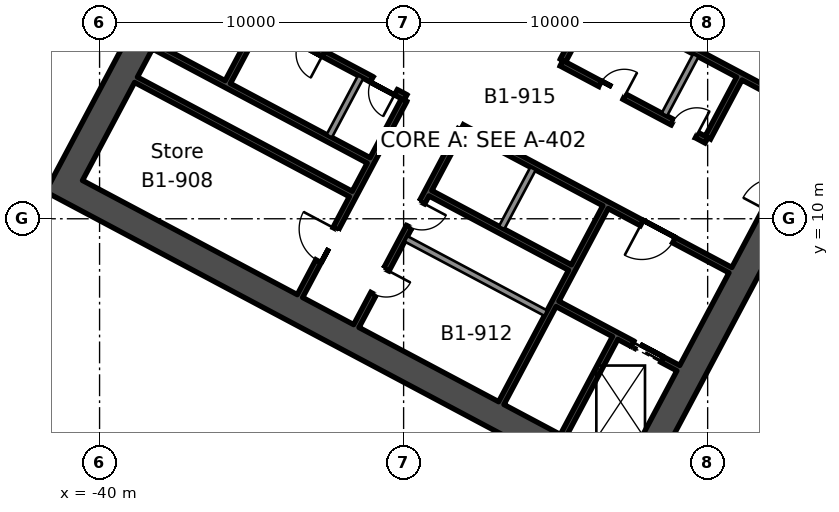
"""IFC4 building model, lengths in metres.
Left out: names, types, materials, properties, quantities, classifications, styles, units other than length and angle.
Written with IfcOpenShell. Run it as: python <this file> out.ifc"""

import sys

from ifc_helpers import new_model, si_unit, direction, frame, frame_2d, origin, place, context, subcontext, project, spatial, rectangle, extrude, element, fill, save


model = new_model("IFC4")
c1 = context("Model", 3, precision=1e-05, world=origin(), true_north=direction((0.0, 1.0)))
c2 = subcontext(c1, "Body", "Model", "MODEL_VIEW")
j1 = project(units=[si_unit("LENGTHUNIT", "METRE"), si_unit("PLANEANGLEUNIT", "RADIAN")], contexts=[c1])
p1 = place(None, origin())
s1 = spatial("IfcSite", under=j1, at=p1, CompositionType="ELEMENT")
p2 = place(p1, origin())
s2 = spatial("IfcBuilding", under=s1, at=p2, CompositionType="ELEMENT")
p3 = place(p2, frame((0.0, 0.0, -4.5)))
s3 = spatial("IfcBuildingStorey", under=s2, at=p3, CompositionType="ELEMENT", Elevation=-4.5)
p4 = place(p3, frame((-13.362, 18.43, 0.0), z_axis=(0.0, 0.0, 1.0), x_axis=(-0.46947084998, -0.882947971864, 0.0)))
e1 = element("IfcWall", 1, at=p4, inside=s3, PredefinedType="SHEAR", context=c2, shape_type="SweptSolid", body=[
    extrude(rectangle(XDim=20.0, YDim=0.9, at=frame_2d((10.0, 0.0))), origin(), (0.0, 0.0, 1.0), 4.5),
])
p5 = place(p4, frame((7.0, 0.0, 0.0)))
e2 = element("IfcOpeningElement", 2, at=p5, cuts=e1, PredefinedType="OPENING", context=c2, shape_type="SweptSolid", body=[
    extrude(rectangle(XDim=2.4, YDim=2.4, at=frame_2d((1.2, 1.2))), frame((0.0, 0.46, 0.0), z_axis=(0.0, -1.0, 0.0), x_axis=(1.0, 0.0, 0.0)), (0.0, 0.0, 1.0), 0.92),
])
p6 = place(p3, frame((-31.992, 28.336, 0.0), z_axis=(0.0, 0.0, 1.0), x_axis=(-0.46947084998, -0.882947971864, 0.0)))
e3 = element("IfcWall", 3, at=p6, inside=s3, PredefinedType="SHEAR", context=c2, shape_type="SweptSolid", body=[
    extrude(rectangle(XDim=20.0, YDim=0.9, at=frame_2d((10.0, 0.0))), origin(), (0.0, 0.0, 1.0), 4.5),
])
p7 = place(p6, frame((10.6, 0.0, 0.0)))
e4 = element("IfcOpeningElement", 4, at=p7, cuts=e3, PredefinedType="OPENING", context=c2, shape_type="SweptSolid", body=[
    extrude(rectangle(XDim=2.4, YDim=2.4, at=frame_2d((1.2, 1.2))), frame((0.0, 0.46, 0.0), z_axis=(0.0, -1.0, 0.0), x_axis=(1.0, 0.0, 0.0)), (0.0, 0.0, 1.0), 0.92),
])
p8 = place(p3, frame((-22.937, 1.38, 0.0), z_axis=(0.0, 0.0, 1.0), x_axis=(-0.88295276571, 0.46946183394, 0.0)))
e5 = element("IfcWall", 5, at=p8, inside=s3, PredefinedType="SHEAR", context=c2, shape_type="SweptSolid", body=[
    extrude(rectangle(XDim=20.2, YDim=0.9, at=frame_2d((10.1, 0.0))), origin(), (0.0, 0.0, 1.0), 4.5),
])
p9 = place(p3, frame((-23.043, 6.08, 0.0), z_axis=(0.0, 0.0, 1.0), x_axis=(-0.469494272526, -0.882935517501, 0.0)))
e6 = element("IfcWall", 6, at=p9, inside=s3, PredefinedType="SHEAR", context=c2, shape_type="SweptSolid", body=[
    extrude(rectangle(XDim=3.65, YDim=0.2, at=frame_2d((1.825, 0.0))), origin(), (0.0, 0.0, 1.0), 4.5),
])
p10 = place(p3, frame((-18.96, 14.611, 0.0), z_axis=(0.0, 0.0, 1.0), x_axis=(-0.4694473164, -0.882960484464, 0.0)))
e7 = element("IfcWall", 7, at=p10, inside=s3, PredefinedType="SHEAR", context=c2, shape_type="SweptSolid", body=[
    extrude(rectangle(XDim=2.2, YDim=0.2, at=frame_2d((1.1, 0.0))), origin(), (0.0, 0.0, 1.0), 4.5),
])
p11 = place(p3, frame((-20.39, 15.372, 0.0), z_axis=(0.0, 0.0, 1.0), x_axis=(-0.4694473164, -0.882960484464, 0.0)))
e8 = element("IfcWall", 8, at=p11, inside=s3, PredefinedType="SOLIDWALL", context=c2, shape_type="SweptSolid", body=[
    extrude(rectangle(XDim=2.2, YDim=0.2, at=frame_2d((1.1, 0.0))), origin(), (0.0, 0.0, 1.0), 4.5),
])
p12 = place(p3, frame((-23.36, 10.382, 0.0), z_axis=(0.0, 0.0, 1.0), x_axis=(-0.469480409012, -0.88294288918, 0.0)))
e9 = element("IfcWall", 9, at=p12, inside=s3, PredefinedType="SHEAR", context=c2, shape_type="SweptSolid", body=[
    extrude(rectangle(XDim=7.3, YDim=0.2, at=frame_2d((3.65, 0.0))), origin(), (0.0, 0.0, 1.0), 4.5),
])
p13 = place(p3, frame((-25.744, 11.65, 0.0), z_axis=(0.0, 0.0, 1.0), x_axis=(-0.469487830541, -0.882938942948, 0.0)))
e10 = element("IfcWall", 10, at=p13, inside=s3, PredefinedType="SOLIDWALL", context=c2, shape_type="SweptSolid", body=[
    extrude(rectangle(XDim=2.2, YDim=0.2, at=frame_2d((1.1, 0.0))), origin(), (0.0, 0.0, 1.0), 4.5),
])
p14 = place(p3, frame((-21.333, 21.649, 0.0), z_axis=(0.0, 0.0, 1.0), x_axis=(-0.469494272526, -0.882935517501, 0.0)))
e11 = element("IfcWall", 11, at=p14, inside=s3, PredefinedType="SHEAR", context=c2, shape_type="SweptSolid", body=[
    extrude(rectangle(XDim=7.3, YDim=0.2, at=frame_2d((3.65, 0.0))), origin(), (0.0, 0.0, 1.0), 4.5),
])
p15 = place(p14, frame((1.3, 0.0, 0.0)))
e12 = element("IfcOpeningElement", 12, at=p15, cuts=e11, PredefinedType="OPENING", context=c2, shape_type="SweptSolid", body=[
    extrude(rectangle(XDim=1.2, YDim=2.1, at=frame_2d((0.6, 1.05))), frame((0.0, 0.11, 0.0), z_axis=(0.0, -1.0, 0.0), x_axis=(1.0, 0.0, 0.0)), (0.0, 0.0, 1.0), 0.22),
])
p16 = place(p3, frame((-28.128, 12.917, 0.0), z_axis=(0.0, 0.0, 1.0), x_axis=(-0.469454336211, -0.882956752176, 0.0)))
e13 = element("IfcWall", 13, at=p16, inside=s3, PredefinedType="SHEAR", context=c2, shape_type="SweptSolid", body=[
    extrude(rectangle(XDim=7.3, YDim=0.2, at=frame_2d((3.65, 0.0))), origin(), (0.0, 0.0, 1.0), 4.5),
])
p17 = place(p16, frame((2.7, 0.0, 0.0)))
e14 = element("IfcOpeningElement", 14, at=p17, cuts=e13, PredefinedType="OPENING", context=c2, shape_type="SweptSolid", body=[
    extrude(rectangle(XDim=0.9, YDim=2.1, at=frame_2d((0.45, 1.05))), frame((0.0, 0.11, 0.0), z_axis=(0.0, -1.0, 0.0), x_axis=(1.0, 0.0, 0.0)), (0.0, 0.0, 1.0), 0.22),
])
p18 = place(p16, frame((5.2, 0.0, 0.0)))
e15 = element("IfcOpeningElement", 15, at=p18, cuts=e13, PredefinedType="OPENING", context=c2, shape_type="SweptSolid", body=[
    extrude(rectangle(XDim=0.9, YDim=2.1, at=frame_2d((0.45, 1.05))), frame((0.0, 0.11, 0.0), z_axis=(0.0, -1.0, 0.0), x_axis=(1.0, 0.0, 0.0)), (0.0, 0.0, 1.0), 0.22),
])
p19 = place(p3, frame((-29.982, 13.903, 0.0), z_axis=(0.0, 0.0, 1.0), x_axis=(-0.469454336211, -0.882956752176, 0.0)))
e16 = element("IfcWall", 16, at=p19, inside=s3, PredefinedType="SHEAR", context=c2, shape_type="SweptSolid", body=[
    extrude(rectangle(XDim=7.3, YDim=0.2, at=frame_2d((3.65, 0.0))), origin(), (0.0, 0.0, 1.0), 4.5),
])
p20 = place(p19, frame((4.8, 0.0, 0.0)))
e17 = element("IfcOpeningElement", 17, at=p20, cuts=e16, PredefinedType="OPENING", context=c2, shape_type="SweptSolid", body=[
    extrude(rectangle(XDim=1.2, YDim=2.1, at=frame_2d((0.6, 1.05))), frame((0.0, 0.11, 0.0), z_axis=(0.0, -1.0, 0.0), x_axis=(1.0, 0.0, 0.0)), (0.0, 0.0, 1.0), 0.22),
])
p21 = place(p3, frame((-31.413, 14.664, 0.0), z_axis=(0.0, 0.0, 1.0), x_axis=(-0.469533832133, -0.882914480843, 0.0)))
e18 = element("IfcWall", 18, at=p21, inside=s3, PredefinedType="SOLIDWALL", context=c2, shape_type="SweptSolid", body=[
    extrude(rectangle(XDim=2.2, YDim=0.2, at=frame_2d((1.1, 0.0))), origin(), (0.0, 0.0, 1.0), 4.5),
])
p22 = place(p3, frame((-34.75, 16.438, 0.0), z_axis=(0.0, 0.0, 1.0), x_axis=(-0.469401318492, -0.882984938828, 0.0)))
e19 = element("IfcWall", 19, at=p22, inside=s3, PredefinedType="SHEAR", context=c2, shape_type="SweptSolid", body=[
    extrude(rectangle(XDim=2.2, YDim=0.2, at=frame_2d((1.1, 0.0))), origin(), (0.0, 0.0, 1.0), 4.5),
])
p23 = place(p3, frame((-15.942, 14.536, 0.0), z_axis=(0.0, 0.0, 1.0), x_axis=(-0.882946947542, 0.469472776449, 0.0)))
e20 = element("IfcWall", 20, at=p23, inside=s3, PredefinedType="SHEAR", context=c2, shape_type="SweptSolid", body=[
    extrude(rectangle(XDim=8.0, YDim=0.2, at=frame_2d((4.0, 0.0))), origin(), (0.0, 0.0, 1.0), 4.5),
])
p24 = place(p3, frame((-16.529, 13.432, 0.0), z_axis=(0.0, 0.0, 1.0), x_axis=(-0.88295287151, 0.469461634952, 0.0)))
e21 = element("IfcWall", 21, at=p24, inside=s3, PredefinedType="SHEAR", context=c2, shape_type="SweptSolid", body=[
    extrude(rectangle(XDim=8.0, YDim=0.2, at=frame_2d((4.0, 0.0))), origin(), (0.0, 0.0, 1.0), 4.5),
])
p25 = place(p3, frame((-20.04, 12.581, 0.0), z_axis=(0.0, 0.0, 1.0), x_axis=(-0.882942972946, 0.469480251476, 0.0)))
e22 = element("IfcWall", 22, at=p25, inside=s3, PredefinedType="SHEAR", context=c2, shape_type="SweptSolid", body=[
    extrude(rectangle(XDim=5.4, YDim=0.2, at=frame_2d((2.7, 0.0))), origin(), (0.0, 0.0, 1.0), 4.5),
])
p26 = place(p25, frame((0.36, 0.0, 0.0)))
e23 = element("IfcOpeningElement", 23, at=p26, cuts=e22, PredefinedType="OPENING", context=c2, shape_type="SweptSolid", body=[
    extrude(rectangle(XDim=0.9, YDim=2.1, at=frame_2d((0.45, 1.05))), frame((0.0, 0.11, 0.0), z_axis=(0.0, -1.0, 0.0), x_axis=(1.0, 0.0, 0.0)), (0.0, 0.0, 1.0), 0.22),
])
p27 = place(p25, frame((3.06, 0.0, 0.0)))
e24 = element("IfcOpeningElement", 24, at=p27, cuts=e22, PredefinedType="OPENING", context=c2, shape_type="SweptSolid", body=[
    extrude(rectangle(XDim=0.9, YDim=2.1, at=frame_2d((0.45, 1.05))), frame((0.0, 0.11, 0.0), z_axis=(0.0, -1.0, 0.0), x_axis=(1.0, 0.0, 0.0)), (0.0, 0.0, 1.0), 0.22),
])
p28 = place(p3, frame((-19.252, 8.311, 0.0), z_axis=(0.0, 0.0, 1.0), x_axis=(-0.882955722218, 0.469456273365, 0.0)))
e25 = element("IfcWall", 25, at=p28, inside=s3, PredefinedType="SHEAR", context=c2, shape_type="SweptSolid", body=[
    extrude(rectangle(XDim=10.0, YDim=0.2, at=frame_2d((5.0, 0.0))), origin(), (0.0, 0.0, 1.0), 4.5),
])
p29 = place(p28, frame((2.1, 0.0, 0.0)))
e26 = element("IfcOpeningElement", 26, at=p29, cuts=e25, PredefinedType="OPENING", context=c2, shape_type="SweptSolid", body=[
    extrude(rectangle(XDim=1.2, YDim=2.1, at=frame_2d((0.6, 1.05))), frame((0.0, 0.11, 0.0), z_axis=(0.0, -1.0, 0.0), x_axis=(1.0, 0.0, 0.0)), (0.0, 0.0, 1.0), 0.22),
])
p30 = place(p3, frame((-29.935, 13.991, 0.0), z_axis=(0.0, 0.0, 1.0), x_axis=(-0.882952937579, 0.469461510692, 0.0)))
e27 = element("IfcWall", 27, at=p30, inside=s3, PredefinedType="SHEAR", context=c2, shape_type="SweptSolid", body=[
    extrude(rectangle(XDim=5.4, YDim=0.2, at=frame_2d((2.7, 0.0))), origin(), (0.0, 0.0, 1.0), 4.5),
])
p31 = place(p30, frame((0.36, 0.0, 0.0)))
e28 = element("IfcOpeningElement", 28, at=p31, cuts=e27, PredefinedType="OPENING", context=c2, shape_type="SweptSolid", body=[
    extrude(rectangle(XDim=0.9, YDim=2.1, at=frame_2d((0.45, 1.05))), frame((0.0, 0.11, 0.0), z_axis=(0.0, -1.0, 0.0), x_axis=(1.0, 0.0, 0.0)), (0.0, 0.0, 1.0), 0.22),
])
p32 = place(p30, frame((3.06, 0.0, 0.0)))
e29 = element("IfcOpeningElement", 29, at=p32, cuts=e27, PredefinedType="OPENING", context=c2, shape_type="SweptSolid", body=[
    extrude(rectangle(XDim=0.9, YDim=2.1, at=frame_2d((0.45, 1.05))), frame((0.0, 0.11, 0.0), z_axis=(0.0, -1.0, 0.0), x_axis=(1.0, 0.0, 0.0)), (0.0, 0.0, 1.0), 0.22),
])
p33 = place(p3, frame((-24.528, 8.398, 0.0), z_axis=(0.0, 0.0, 1.0), x_axis=(-0.882953967957, 0.469459572775, 0.0)))
e30 = element("IfcWall", 30, at=p33, inside=s3, PredefinedType="SHEAR", context=c2, shape_type="SweptSolid", body=[
    extrude(rectangle(XDim=5.2, YDim=0.2, at=frame_2d((2.6, 0.0))), origin(), (0.0, 0.0, 1.0), 4.5),
])
p34 = place(p3, frame((-31.15, 11.919, 0.0), z_axis=(0.0, 0.0, 1.0), x_axis=(-0.882940221191, 0.469485426614, 0.0)))
e31 = element("IfcWall", 31, at=p34, inside=s3, PredefinedType="SHEAR", context=c2, shape_type="SweptSolid", body=[
    extrude(rectangle(XDim=8.0, YDim=0.2, at=frame_2d((4.0, 0.0))), origin(), (0.0, 0.0, 1.0), 4.5),
])
p35 = place(p3, frame((-20.965, 5.088, 0.0), z_axis=(0.0, 0.0, 1.0), x_axis=(-0.882925986334, 0.469512196493, 0.0)))
e32 = element("IfcWall", 32, at=p35, inside=s3, PredefinedType="SHEAR", context=c2, shape_type="SweptSolid", body=[
    extrude(rectangle(XDim=4.5, YDim=0.2, at=frame_2d((2.25, 0.0))), origin(), (0.0, 0.0, 1.0), 4.5),
])
p36 = place(p35, frame((0.6, 0.0, 0.0)))
e33 = element("IfcOpeningElement", 33, at=p36, cuts=e32, PredefinedType="OPENING", context=c2, shape_type="SweptSolid", body=[
    extrude(rectangle(XDim=1.1, YDim=2.1, at=frame_2d((0.55, 1.05))), frame((0.0, 0.11, 0.0), z_axis=(0.0, -1.0, 0.0), x_axis=(1.0, 0.0, 0.0)), (0.0, 0.0, 1.0), 0.22),
])
p37 = place(p3, frame((-31.737, 10.816, 0.0), z_axis=(0.0, 0.0, 1.0), x_axis=(-0.882940221191, 0.469485426614, 0.0)))
e34 = element("IfcWall", 34, at=p37, inside=s3, PredefinedType="SHEAR", context=c2, shape_type="SweptSolid", body=[
    extrude(rectangle(XDim=8.0, YDim=0.2, at=frame_2d((4.0, 0.0))), origin(), (0.0, 0.0, 1.0), 4.5),
])
p38 = place(p3, frame((-25.326, 6.897, 0.0), z_axis=(0.0, 0.0, 1.0), x_axis=(-0.882953967957, 0.469459572775, 0.0)))
e35 = element("IfcWall", 35, at=p38, inside=s3, PredefinedType="SOLIDWALL", context=c2, shape_type="SweptSolid", body=[
    extrude(rectangle(XDim=5.2, YDim=0.2, at=frame_2d((2.6, 0.0))), origin(), (0.0, 0.0, 1.0), 4.5),
])
p39 = place(p29, origin())
e36 = element("IfcDoor", 36, at=p39, inside=s3, OperationType="SINGLE_SWING_RIGHT", PredefinedType="DOOR", context=c2, shape_type="SweptSolid", body=[
    extrude(rectangle(XDim=1.2, YDim=2.1, at=frame_2d((0.6, 1.05))), frame((0.0, 0.025, 0.0), z_axis=(0.0, -1.0, 0.0), x_axis=(1.0, 0.0, 0.0)), (0.0, 0.0, 1.0), 0.05),
])
fill(e26, e36)
p40 = place(p20, frame((1.2, 0.0, 0.0), z_axis=(0.0, 0.0, 1.0), x_axis=(-1.0, 0.0, 0.0)))
e37 = element("IfcDoor", 37, at=p40, inside=s3, OperationType="SINGLE_SWING_RIGHT", PredefinedType="DOOR", context=c2, shape_type="SweptSolid", body=[
    extrude(rectangle(XDim=1.2, YDim=2.1, at=frame_2d((0.6, 1.05))), frame((0.0, 0.025, 0.0), z_axis=(0.0, -1.0, 0.0), x_axis=(1.0, 0.0, 0.0)), (0.0, 0.0, 1.0), 0.05),
])
fill(e17, e37)
p41 = place(p31, origin())
e38 = element("IfcDoor", 38, at=p41, inside=s3, OperationType="SINGLE_SWING_LEFT", PredefinedType="DOOR", context=c2, shape_type="SweptSolid", body=[
    extrude(rectangle(XDim=0.9, YDim=2.1, at=frame_2d((0.45, 1.05))), frame((0.0, 0.025, 0.0), z_axis=(0.0, -1.0, 0.0), x_axis=(1.0, 0.0, 0.0)), (0.0, 0.0, 1.0), 0.05),
])
fill(e28, e38)
p42 = place(p32, origin())
e39 = element("IfcDoor", 39, at=p42, inside=s3, OperationType="SINGLE_SWING_LEFT", PredefinedType="DOOR", context=c2, shape_type="SweptSolid", body=[
    extrude(rectangle(XDim=0.9, YDim=2.1, at=frame_2d((0.45, 1.05))), frame((0.0, 0.025, 0.0), z_axis=(0.0, -1.0, 0.0), x_axis=(1.0, 0.0, 0.0)), (0.0, 0.0, 1.0), 0.05),
])
fill(e29, e39)
p43 = place(p26, frame((0.9, 0.0, 0.0), z_axis=(0.0, 0.0, 1.0), x_axis=(-1.0, 0.0, 0.0)))
e40 = element("IfcDoor", 40, at=p43, inside=s3, OperationType="SINGLE_SWING_RIGHT", PredefinedType="DOOR", context=c2, shape_type="SweptSolid", body=[
    extrude(rectangle(XDim=0.9, YDim=2.1, at=frame_2d((0.45, 1.05))), frame((0.0, 0.025, 0.0), z_axis=(0.0, -1.0, 0.0), x_axis=(1.0, 0.0, 0.0)), (0.0, 0.0, 1.0), 0.05),
])
fill(e23, e40)
p44 = place(p27, frame((0.9, 0.0, 0.0), z_axis=(0.0, 0.0, 1.0), x_axis=(-1.0, 0.0, 0.0)))
e41 = element("IfcDoor", 41, at=p44, inside=s3, OperationType="SINGLE_SWING_RIGHT", PredefinedType="DOOR", context=c2, shape_type="SweptSolid", body=[
    extrude(rectangle(XDim=0.9, YDim=2.1, at=frame_2d((0.45, 1.05))), frame((0.0, 0.025, 0.0), z_axis=(0.0, -1.0, 0.0), x_axis=(1.0, 0.0, 0.0)), (0.0, 0.0, 1.0), 0.05),
])
fill(e24, e41)
p45 = place(p36, origin())
e42 = element("IfcDoor", 42, at=p45, inside=s3, OperationType="DOUBLE_DOOR_SLIDING", PredefinedType="DOOR", context=c2, shape_type="SweptSolid", body=[
    extrude(rectangle(XDim=1.1, YDim=2.1, at=frame_2d((0.55, 1.05))), frame((0.0, 0.025, 0.0), z_axis=(0.0, -1.0, 0.0), x_axis=(1.0, 0.0, 0.0)), (0.0, 0.0, 1.0), 0.05),
])
fill(e33, e42)
p46 = place(p17, origin())
e43 = element("IfcDoor", 43, at=p46, inside=s3, OperationType="SINGLE_SWING_LEFT", PredefinedType="DOOR", context=c2, shape_type="SweptSolid", body=[
    extrude(rectangle(XDim=0.9, YDim=2.1, at=frame_2d((0.45, 1.05))), frame((0.0, 0.025, 0.0), z_axis=(0.0, -1.0, 0.0), x_axis=(1.0, 0.0, 0.0)), (0.0, 0.0, 1.0), 0.05),
])
fill(e14, e43)
p47 = place(p18, origin())
e44 = element("IfcDoor", 44, at=p47, inside=s3, OperationType="SINGLE_SWING_LEFT", PredefinedType="DOOR", context=c2, shape_type="SweptSolid", body=[
    extrude(rectangle(XDim=0.9, YDim=2.1, at=frame_2d((0.45, 1.05))), frame((0.0, 0.025, 0.0), z_axis=(0.0, -1.0, 0.0), x_axis=(1.0, 0.0, 0.0)), (0.0, 0.0, 1.0), 0.05),
])
fill(e15, e44)
save(model, sys.argv[1])
